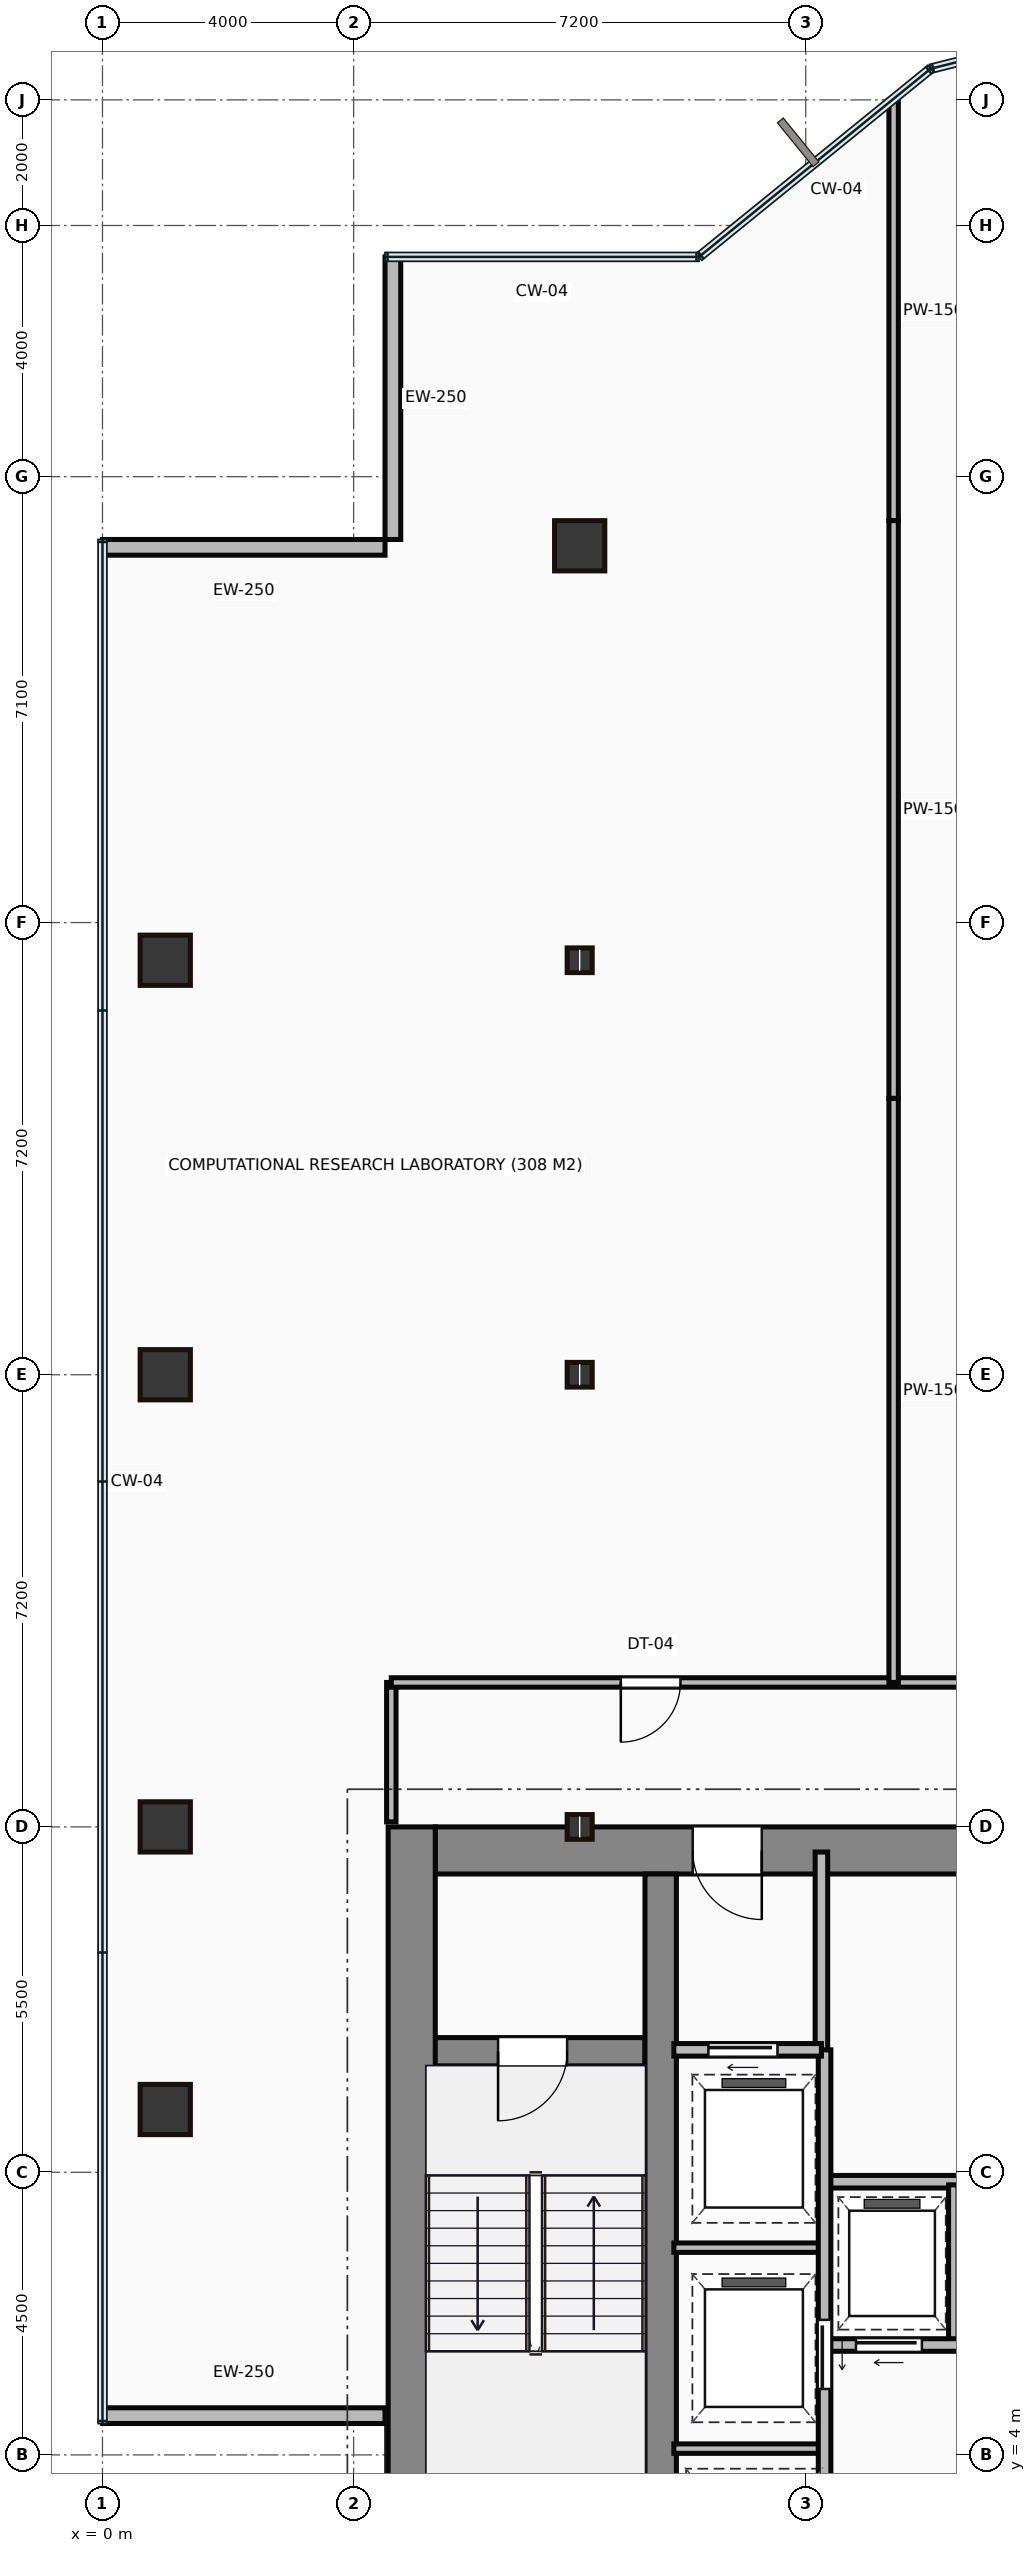
"""IFC4 building model, lengths in metres.
Left out: names, types, materials, properties, quantities, classifications, styles, units other than length and angle.
Written with IfcOpenShell. Run it as: python <this file> out.ifc"""

import sys

from ifc_helpers import new_model, si_unit, direction, frame, frame_2d, origin, origin_2d, place, context, subcontext, project, spatial, rectangle, hollow_rectangle, i_section, extrude, source, transform, mapped, element, fill, save


model = new_model("IFC4")
c1 = context("Model", 3, precision=1e-05, world=origin(), true_north=direction((0.0, 1.0)))
c2 = subcontext(c1, "Body", "Model", "MODEL_VIEW")
j1 = project(units=[si_unit("LENGTHUNIT", "METRE"), si_unit("PLANEANGLEUNIT", "RADIAN")], contexts=[c1])
p1 = place(None, origin())
s1 = spatial("IfcSite", under=j1, at=p1, CompositionType="ELEMENT")
p2 = place(p1, origin())
s2 = spatial("IfcBuilding", under=s1, at=p2, CompositionType="ELEMENT")
p3 = place(p2, frame((0.0, 0.0, 99.6)))
s3 = spatial("IfcBuildingStorey", under=s2, at=p3, CompositionType="ELEMENT", Elevation=99.6)
m1 = source(origin(), c2, "Body", "SweptSolid", [
    extrude(rectangle(XDim=13.1, YDim=0.75, at=frame_2d((6.55, 0.0))), origin(), (0.0, 0.0, 1.0), 3.65),
])
p4 = place(p3, frame((4.925, 0.9, 0.0), z_axis=(0.0, 0.0, 1.0), x_axis=(0.0, 1.0, 0.0)))
e1 = element("IfcWall", 1, at=p4, inside=s3, PredefinedType="SHEAR", context=c2, shape_type="MappedRepresentation", body=[
    mapped(m1, transform((0.0, 0.0, 0.0))),
])
m2 = source(origin(), c2, "Body", "SweptSolid", [
    extrude(rectangle(XDim=9.1, YDim=0.75, at=frame_2d((4.55, 0.0))), origin(), (0.0, 0.0, 1.0), 3.65),
])
p5 = place(p3, frame((5.3, 13.625, 0.0), z_axis=(0.0, 0.0, 1.0), x_axis=(1.0, 0.0, 0.0)))
e2 = element("IfcWall", 2, at=p5, inside=s3, PredefinedType="SHEAR", context=c2, shape_type="MappedRepresentation", body=[
    mapped(m2, transform((0.0, 0.0, 0.0))),
])
p6 = place(p5, frame((4.1, 0.0, 0.0)))
e3 = element("IfcOpeningElement", 3, at=p6, cuts=e2, PredefinedType="OPENING", context=c2, shape_type="SweptSolid", body=[
    extrude(rectangle(XDim=1.1, YDim=2.15, at=frame_2d((0.55, 1.075))), frame((0.0, 0.385, 0.0), z_axis=(0.0, -1.0, 0.0), x_axis=(1.0, 0.0, 0.0)), (0.0, 0.0, 1.0), 0.77),
])
m3 = source(origin(), c2, "Body", "SweptSolid", [
    extrude(rectangle(XDim=12.35, YDim=0.5, at=frame_2d((6.175, 0.0))), origin(), (0.0, 0.0, 1.0), 3.65),
])
p7 = place(p3, frame((8.89, 0.9, 0.0), z_axis=(0.0, 0.0, 1.0), x_axis=(0.0, 1.0, 0.0)))
e4 = element("IfcWall", 4, at=p7, inside=s3, PredefinedType="SHEAR", context=c2, shape_type="MappedRepresentation", body=[
    mapped(m3, transform((0.0, 0.0, 0.0))),
])
m4 = source(origin(), c2, "Body", "SweptSolid", [
    extrude(rectangle(XDim=3.39, YDim=0.45, at=frame_2d((1.695, 0.0))), origin(), (0.0, 0.0, 1.0), 3.65),
])
p8 = place(p3, frame((5.25, 10.42, 0.0), z_axis=(0.0, 0.0, 1.0), x_axis=(1.0, 0.0, 0.0)))
e5 = element("IfcWall", 5, at=p8, inside=s3, PredefinedType="SHEAR", context=c2, shape_type="MappedRepresentation", body=[
    mapped(m4, transform((0.0, 0.0, 0.0))),
])
p9 = place(p8, frame((1.05, 0.0, 0.0)))
e6 = element("IfcOpeningElement", 6, at=p9, cuts=e5, PredefinedType="OPENING", context=c2, shape_type="SweptSolid", body=[
    extrude(rectangle(XDim=1.1, YDim=2.15, at=frame_2d((0.55, 1.075))), frame((0.0, 0.235, 0.0), z_axis=(0.0, -1.0, 0.0), x_axis=(1.0, 0.0, 0.0)), (0.0, 0.0, 1.0), 0.47),
])
m5 = source(origin(), c2, "Body", "SweptSolid", [
    extrude(hollow_rectangle(XDim=0.8, YDim=0.8, WallThickness=0.04, at=origin_2d()), origin(), (0.0, 0.0, 1.0), 3.65),
])
for number, where, z_axis, x_axis in (
    (7, (1.0, 9.5, 0.0), (0.0, 0.0, 1.0), (1.0, 0.0, 0.0)),
    (8, (1.0, 14.0, 0.0), (0.0, 0.0, 1.0), (1.0, 0.0, 0.0)),
    (9, (1.0, 21.2, 0.0), (0.0, 0.0, 1.0), (1.0, 0.0, 0.0)),
    (10, (1.0, 27.8, 0.0), (0.0, 0.0, 1.0), (1.0, 0.0, 0.0)),
):
    element("IfcColumn", number, at=place(p3, frame(where, z_axis=z_axis, x_axis=x_axis)), inside=s3, PredefinedType="COLUMN", context=c2, shape_type="MappedRepresentation", body=[
        mapped(m5, transform((0.0, 0.0, 0.0))),
    ])
m6 = source(origin(), c2, "Body", "SweptSolid", [
    extrude(i_section(OverallWidth=0.399, OverallDepth=0.393, WebThickness=0.023, FlangeThickness=0.037, at=origin_2d()), origin(), (0.0, 0.0, 1.0), 3.65),
])
for number, where, z_axis, x_axis in (
    (11, (7.6, 14.0, 0.0), (0.0, 0.0, 1.0), (1.0, 0.0, 0.0)),
    (12, (7.6, 21.2, 0.0), (0.0, 0.0, 1.0), (1.0, 0.0, 0.0)),
    (13, (7.6, 27.8, 0.0), (0.0, 0.0, 1.0), (1.0, 0.0, 0.0)),
):
    element("IfcColumn", number, at=place(p3, frame(where, z_axis=z_axis, x_axis=x_axis)), inside=s3, PredefinedType="COLUMN", context=c2, shape_type="MappedRepresentation", body=[
        mapped(m6, transform((0.0, 0.0, 0.0))),
    ])
p10 = place(p3, frame((7.6, 34.4, 0.0), z_axis=(0.0, 0.0, 1.0), x_axis=(1.0, 0.0, 0.0)))
e14 = element("IfcColumn", 14, at=p10, inside=s3, PredefinedType="COLUMN", context=c2, shape_type="MappedRepresentation", body=[
    mapped(m5, transform((0.0, 0.0, 0.0))),
])
m7 = source(origin(), c2, "Body", "SweptSolid", [
    extrude(rectangle(XDim=4.5, YDim=0.25, at=frame_2d((2.25, 0.0))), origin(), (0.0, 0.0, 1.0), 3.4),
])
for number, where, z_axis, x_axis in (
    (15, (4.625, 39.0, 0.0), (0.0, 0.0, 1.0), (0.0, -1.0, 0.0)),
    (16, (4.5, 34.375, 0.0), (0.0, 0.0, 1.0), (-1.0, 0.0, 0.0)),
    (17, (0.0, 4.625, 0.0), (0.0, 0.0, 1.0), (1.0, 0.0, 0.0)),
):
    element("IfcWall", number, at=place(p3, frame(where, z_axis=z_axis, x_axis=x_axis)), inside=s3, PredefinedType="STANDARD", context=c2, shape_type="MappedRepresentation", body=[
        mapped(m7, transform((0.0, 0.0, 0.0))),
    ])
m8 = source(origin(), c2, "Body", "SweptSolid", [
    extrude(rectangle(XDim=3.18, YDim=0.2, at=frame_2d((1.59, 0.0))), origin(), (0.0, 0.0, 1.0), 3.4),
])
p11 = place(p3, frame((11.45, 10.42, 0.0), z_axis=(0.0, 0.0, 1.0), x_axis=(0.0, 1.0, 0.0)))
e18 = element("IfcWall", 18, at=p11, inside=s3, PredefinedType="PARTITIONING", context=c2, shape_type="MappedRepresentation", body=[
    mapped(m8, transform((0.0, 0.0, 0.0))),
])
m9 = source(origin(), c2, "Body", "SweptSolid", [
    extrude(rectangle(XDim=2.35, YDim=0.2, at=frame_2d((1.175, 0.0))), origin(), (0.0, 0.0, 1.0), 3.4),
])
p12 = place(p3, frame((9.1, 10.45, 0.0), z_axis=(0.0, 0.0, 1.0), x_axis=(1.0, 0.0, 0.0)))
e19 = element("IfcWall", 19, at=p12, inside=s3, PredefinedType="PARTITIONING", context=c2, shape_type="MappedRepresentation", body=[
    mapped(m9, transform((0.0, 0.0, 0.0))),
])
p13 = place(p12, frame((0.55, 0.0, 0.0)))
e20 = element("IfcOpeningElement", 20, at=p13, cuts=e19, PredefinedType="OPENING", context=c2, shape_type="SweptSolid", body=[
    extrude(rectangle(XDim=1.1, YDim=2.15, at=frame_2d((0.55, 1.075))), frame((0.0, 0.11, 0.0), z_axis=(0.0, -1.0, 0.0), x_axis=(1.0, 0.0, 0.0)), (0.0, 0.0, 1.0), 0.22),
])
m10 = source(origin(), c2, "Body", "SweptSolid", [
    extrude(rectangle(XDim=9.6, YDim=0.2, at=frame_2d((4.8, 0.0))), origin(), (0.0, 0.0, 1.0), 3.4),
])
p14 = place(p3, frame((11.5, 0.85, 0.0), z_axis=(0.0, 0.0, 1.0), x_axis=(0.0, 1.0, 0.0)))
e21 = element("IfcWall", 21, at=p14, inside=s3, PredefinedType="PARTITIONING", context=c2, shape_type="MappedRepresentation", body=[
    mapped(m10, transform((0.0, 0.0, 0.0))),
])
p15 = place(p14, frame((4.2, 0.0, 0.0)))
e22 = element("IfcOpeningElement", 22, at=p15, cuts=e21, PredefinedType="OPENING", context=c2, shape_type="SweptSolid", body=[
    extrude(rectangle(XDim=1.1, YDim=2.15, at=frame_2d((0.55, 1.075))), frame((0.0, 0.11, 0.0), z_axis=(0.0, -1.0, 0.0), x_axis=(1.0, 0.0, 0.0)), (0.0, 0.0, 1.0), 0.22),
])
p16 = place(p14, frame((0.9, 0.0, 0.0)))
e23 = element("IfcOpeningElement", 23, at=p16, cuts=e21, PredefinedType="OPENING", context=c2, shape_type="SweptSolid", body=[
    extrude(rectangle(XDim=1.2, YDim=2.15, at=frame_2d((0.6, 1.075))), frame((0.0, 0.11, 0.0), z_axis=(0.0, -1.0, 0.0), x_axis=(1.0, 0.0, 0.0)), (0.0, 0.0, 1.0), 0.22),
])
m11 = source(origin(), c2, "Body", "SweptSolid", [
    extrude(rectangle(XDim=2.4, YDim=0.15, at=frame_2d((1.2, 0.0))), origin(), (0.0, 0.0, 1.0), 3.4),
])
for number, where, z_axis, x_axis in (
    (24, (9.1, 4.1, 0.0), (0.0, 0.0, 1.0), (1.0, 0.0, 0.0)),
    (25, (9.1, 7.3, 0.0), (0.0, 0.0, 1.0), (1.0, 0.0, 0.0)),
):
    element("IfcWall", number, at=place(p3, frame(where, z_axis=z_axis, x_axis=x_axis)), inside=s3, PredefinedType="PARTITIONING", context=c2, shape_type="MappedRepresentation", body=[
        mapped(m11, transform((0.0, 0.0, 0.0))),
    ])
m12 = source(origin(), c2, "Body", "SweptSolid", [
    extrude(rectangle(XDim=11.85, YDim=0.2, at=frame_2d((5.925, 0.0))), origin(), (0.0, 0.0, 1.0), 3.4),
])
p17 = place(p3, frame((11.55, 5.75, 0.0), z_axis=(0.0, 0.0, 1.0), x_axis=(1.0, 0.0, 0.0)))
e26 = element("IfcWall", 26, at=p17, inside=s3, PredefinedType="PARTITIONING", context=c2, shape_type="MappedRepresentation", body=[
    mapped(m12, transform((0.0, 0.0, 0.0))),
])
p18 = place(p17, frame((0.45, 0.0, 0.0)))
e27 = element("IfcOpeningElement", 27, at=p18, cuts=e26, PredefinedType="OPENING", context=c2, shape_type="SweptSolid", body=[
    extrude(rectangle(XDim=1.05, YDim=2.15, at=frame_2d((0.525, 1.075))), frame((0.0, 0.11, 0.0), z_axis=(0.0, -1.0, 0.0), x_axis=(1.0, 0.0, 0.0)), (0.0, 0.0, 1.0), 0.22),
])
p19 = place(p17, frame((2.4, 0.0, 0.0)))
e28 = element("IfcOpeningElement", 28, at=p19, cuts=e26, PredefinedType="OPENING", context=c2, shape_type="SweptSolid", body=[
    extrude(rectangle(XDim=1.05, YDim=2.15, at=frame_2d((0.525, 1.075))), frame((0.0, 0.11, 0.0), z_axis=(0.0, -1.0, 0.0), x_axis=(1.0, 0.0, 0.0)), (0.0, 0.0, 1.0), 0.22),
])
p20 = place(p17, frame((4.35, 0.0, 0.0)))
e29 = element("IfcOpeningElement", 29, at=p20, cuts=e26, PredefinedType="OPENING", context=c2, shape_type="SweptSolid", body=[
    extrude(rectangle(XDim=1.05, YDim=2.15, at=frame_2d((0.525, 1.075))), frame((0.0, 0.11, 0.0), z_axis=(0.0, -1.0, 0.0), x_axis=(1.0, 0.0, 0.0)), (0.0, 0.0, 1.0), 0.22),
])
p21 = place(p17, frame((6.3, 0.0, 0.0)))
e30 = element("IfcOpeningElement", 30, at=p21, cuts=e26, PredefinedType="OPENING", context=c2, shape_type="SweptSolid", body=[
    extrude(rectangle(XDim=1.05, YDim=2.15, at=frame_2d((0.525, 1.075))), frame((0.0, 0.11, 0.0), z_axis=(0.0, -1.0, 0.0), x_axis=(1.0, 0.0, 0.0)), (0.0, 0.0, 1.0), 0.22),
])
p22 = place(p17, frame((8.25, 0.0, 0.0)))
e31 = element("IfcOpeningElement", 31, at=p22, cuts=e26, PredefinedType="OPENING", context=c2, shape_type="SweptSolid", body=[
    extrude(rectangle(XDim=1.05, YDim=2.15, at=frame_2d((0.525, 1.075))), frame((0.0, 0.11, 0.0), z_axis=(0.0, -1.0, 0.0), x_axis=(1.0, 0.0, 0.0)), (0.0, 0.0, 1.0), 0.22),
])
p23 = place(p17, frame((10.2, 0.0, 0.0)))
e32 = element("IfcOpeningElement", 32, at=p23, cuts=e26, PredefinedType="OPENING", context=c2, shape_type="SweptSolid", body=[
    extrude(rectangle(XDim=1.05, YDim=2.15, at=frame_2d((0.525, 1.075))), frame((0.0, 0.11, 0.0), z_axis=(0.0, -1.0, 0.0), x_axis=(1.0, 0.0, 0.0)), (0.0, 0.0, 1.0), 0.22),
])
p24 = place(p3, frame((11.55, 8.35, 0.0), z_axis=(0.0, 0.0, 1.0), x_axis=(1.0, 0.0, 0.0)))
e33 = element("IfcWall", 33, at=p24, inside=s3, PredefinedType="PARTITIONING", context=c2, shape_type="MappedRepresentation", body=[
    mapped(m12, transform((0.0, 0.0, 0.0))),
])
m13 = source(origin(), c2, "Body", "SweptSolid", [
    extrude(rectangle(XDim=2.5, YDim=0.15, at=frame_2d((1.25, 0.0))), origin(), (0.0, 0.0, 1.0), 3.4),
])
p25 = place(p3, frame((13.55, 5.8, 0.0), z_axis=(0.0, 0.0, 1.0), x_axis=(0.0, 1.0, 0.0)))
e34 = element("IfcWall", 34, at=p25, inside=s3, PredefinedType="PARTITIONING", context=c2, shape_type="MappedRepresentation", body=[
    mapped(m13, transform((0.0, 0.0, 0.0))),
])
m14 = source(origin(), c2, "Body", "SweptSolid", [
    extrude(rectangle(XDim=2.22, YDim=0.15, at=frame_2d((1.11, 0.0))), origin(), (0.0, 0.0, 1.0), 3.4),
])
p26 = place(p3, frame((4.6, 14.08, 0.0), z_axis=(0.0, 0.0, 1.0), x_axis=(0.0, 1.0, 0.0)))
e35 = element("IfcWall", 35, at=p26, inside=s3, PredefinedType="PARTITIONING", context=c2, shape_type="MappedRepresentation", body=[
    mapped(m14, transform((0.0, 0.0, 0.0))),
])
m15 = source(origin(), c2, "Body", "SweptSolid", [
    extrude(rectangle(XDim=25.8, YDim=0.15, at=frame_2d((12.9, 0.0))), origin(), (0.0, 0.0, 1.0), 3.4),
])
p27 = place(p3, frame((4.6, 16.3, 0.0), z_axis=(0.0, 0.0, 1.0), x_axis=(1.0, 0.0, 0.0)))
e36 = element("IfcWall", 36, at=p27, inside=s3, PredefinedType="PARTITIONING", context=c2, shape_type="MappedRepresentation", body=[
    mapped(m15, transform((0.0, 0.0, 0.0))),
])
p28 = place(p27, frame((3.655, 0.0, 0.0)))
e37 = element("IfcOpeningElement", 37, at=p28, cuts=e36, PredefinedType="OPENING", context=c2, shape_type="SweptSolid", body=[
    extrude(rectangle(XDim=0.95, YDim=2.15, at=frame_2d((0.475, 1.075))), frame((0.0, 0.085, 0.0), z_axis=(0.0, -1.0, 0.0), x_axis=(1.0, 0.0, 0.0)), (0.0, 0.0, 1.0), 0.17),
])
p29 = place(p27, frame((16.295, 0.0, 0.0)))
e38 = element("IfcOpeningElement", 38, at=p29, cuts=e36, PredefinedType="OPENING", context=c2, shape_type="SweptSolid", body=[
    extrude(rectangle(XDim=0.95, YDim=2.15, at=frame_2d((0.475, 1.075))), frame((0.0, 0.085, 0.0), z_axis=(0.0, -1.0, 0.0), x_axis=(1.0, 0.0, 0.0)), (0.0, 0.0, 1.0), 0.17),
])
m16 = source(origin(), c2, "Body", "SweptSolid", [
    extrude(rectangle(XDim=6.692, YDim=0.15, at=frame_2d((3.346, 0.0))), origin(), (0.0, 0.0, 1.0), 3.4),
])
p30 = place(p3, frame((12.6, 41.492, 0.0), z_axis=(0.0, 0.0, 1.0), x_axis=(0.0, -1.0, 0.0)))
e39 = element("IfcWall", 39, at=p30, inside=s3, PredefinedType="PARTITIONING", context=c2, shape_type="MappedRepresentation", body=[
    mapped(m16, transform((0.0, 0.0, 0.0))),
])
m17 = source(origin(), c2, "Body", "SweptSolid", [
    extrude(rectangle(XDim=9.2, YDim=0.15, at=frame_2d((4.6, 0.0))), origin(), (0.0, 0.0, 1.0), 3.4),
])
p31 = place(p3, frame((12.6, 34.8, 0.0), z_axis=(0.0, 0.0, 1.0), x_axis=(0.0, -1.0, 0.0)))
e40 = element("IfcWall", 40, at=p31, inside=s3, PredefinedType="PARTITIONING", context=c2, shape_type="MappedRepresentation", body=[
    mapped(m17, transform((0.0, 0.0, 0.0))),
])
m18 = source(origin(), c2, "Body", "SweptSolid", [
    extrude(rectangle(XDim=9.3, YDim=0.15, at=frame_2d((4.65, 0.0))), origin(), (0.0, 0.0, 1.0), 3.4),
])
p32 = place(p3, frame((12.6, 25.6, 0.0), z_axis=(0.0, 0.0, 1.0), x_axis=(0.0, -1.0, 0.0)))
e41 = element("IfcWall", 41, at=p32, inside=s3, PredefinedType="PARTITIONING", context=c2, shape_type="MappedRepresentation", body=[
    mapped(m18, transform((0.0, 0.0, 0.0))),
])
m19 = source(origin(), c2, "Body", "SweptSolid", [
    extrude(rectangle(XDim=1.1, YDim=2.15, at=frame_2d((0.55, 1.075))), frame((0.0, 0.025, 0.0), z_axis=(0.0, -1.0, 0.0), x_axis=(1.0, 0.0, 0.0)), (0.0, 0.0, 1.0), 0.05),
])
p33 = place(p9, frame((1.1, 0.0, 0.0), z_axis=(0.0, 0.0, 1.0), x_axis=(-1.0, 0.0, 0.0)))
e42 = element("IfcDoor", 42, at=p33, inside=s3, OperationType="SINGLE_SWING_LEFT", PredefinedType="DOOR", context=c2, shape_type="MappedRepresentation", body=[
    mapped(m19, transform((0.0, 0.0, 0.0))),
])
fill(e6, e42)
p34 = place(p6, origin())
e43 = element("IfcDoor", 43, at=p34, inside=s3, OperationType="SINGLE_SWING_RIGHT", PredefinedType="DOOR", context=c2, shape_type="MappedRepresentation", body=[
    mapped(m19, transform((0.0, 0.0, 0.0))),
])
fill(e3, e43)
p35 = place(p13, origin())
e44 = element("IfcDoor", 44, at=p35, inside=s3, OperationType="SLIDING_TO_LEFT", PredefinedType="DOOR", context=c2, shape_type="MappedRepresentation", body=[
    mapped(m19, transform((0.0, 0.0, 0.0))),
])
fill(e20, e44)
p36 = place(p15, frame((1.1, 0.0, 0.0), z_axis=(0.0, 0.0, 1.0), x_axis=(-1.0, 0.0, 0.0)))
e45 = element("IfcDoor", 45, at=p36, inside=s3, OperationType="SLIDING_TO_LEFT", PredefinedType="DOOR", context=c2, shape_type="MappedRepresentation", body=[
    mapped(m19, transform((0.0, 0.0, 0.0))),
])
fill(e22, e45)
m20 = source(origin(), c2, "Body", "SweptSolid", [
    extrude(rectangle(XDim=1.05, YDim=2.15, at=frame_2d((0.525, 1.075))), frame((0.0, 0.025, 0.0), z_axis=(0.0, -1.0, 0.0), x_axis=(1.0, 0.0, 0.0)), (0.0, 0.0, 1.0), 0.05),
])
p37 = place(p18, frame((1.05, 0.0, 0.0), z_axis=(0.0, 0.0, 1.0), x_axis=(-1.0, 0.0, 0.0)))
e46 = element("IfcDoor", 46, at=p37, inside=s3, OperationType="SLIDING_TO_LEFT", PredefinedType="DOOR", context=c2, shape_type="MappedRepresentation", body=[
    mapped(m20, transform((0.0, 0.0, 0.0))),
])
fill(e27, e46)
m21 = source(origin(), c2, "Body", "SweptSolid", [
    extrude(rectangle(XDim=0.95, YDim=2.15, at=frame_2d((0.475, 1.075))), frame((0.0, 0.025, 0.0), z_axis=(0.0, -1.0, 0.0), x_axis=(1.0, 0.0, 0.0)), (0.0, 0.0, 1.0), 0.05),
])
p38 = place(p28, origin())
e47 = element("IfcDoor", 47, at=p38, inside=s3, OperationType="SINGLE_SWING_LEFT", PredefinedType="DOOR", context=c2, shape_type="MappedRepresentation", body=[
    mapped(m21, transform((0.0, 0.0, 0.0))),
])
fill(e37, e47)
save(model, sys.argv[1])
